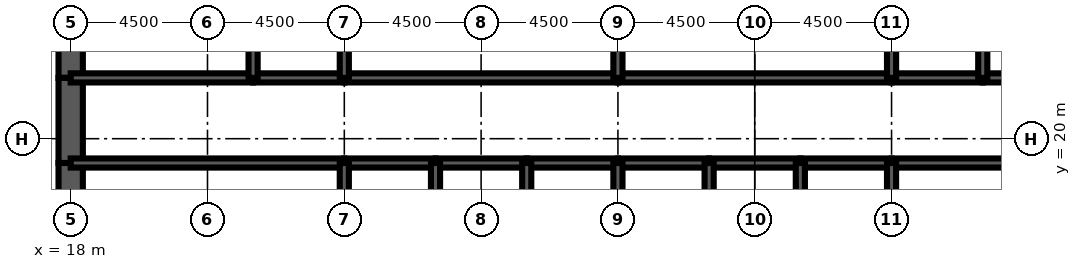
"""IFC4 building model, lengths in metres.
Left out: names, types, materials, properties, quantities, classifications, styles, units other than length and angle.
Written with IfcOpenShell. Run it as: python <this file> out.ifc"""

import sys

from ifc_helpers import new_model, si_unit, direction, frame, frame_2d, origin, place, context, subcontext, project, spatial, rectangle, extrude, element, fill, save


model = new_model("IFC4")
c1 = context("Model", 3, precision=1e-05, world=origin(), true_north=direction((0.0, 1.0)))
c2 = subcontext(c1, "Body", "Model", "MODEL_VIEW")
j1 = project(units=[si_unit("LENGTHUNIT", "METRE"), si_unit("PLANEANGLEUNIT", "RADIAN")], contexts=[c1])
p1 = place(None, origin())
s1 = spatial("IfcSite", under=j1, at=p1, CompositionType="ELEMENT")
p2 = place(p1, origin())
s2 = spatial("IfcBuilding", under=s1, at=p2, CompositionType="ELEMENT")
p3 = place(p2, frame((0.0, 0.0, 215.2)))
s3 = spatial("IfcBuildingStorey", under=s2, at=p3, CompositionType="ELEMENT", Elevation=215.2)
p4 = place(p3, frame((18.0, 26.0, 0.0), z_axis=(0.0, 0.0, 1.0), x_axis=(0.0, -1.0, 0.0)))
e1 = element("IfcWall", 1, at=p4, inside=s3, PredefinedType="SHEAR", context=c2, shape_type="SweptSolid", body=[
    extrude(rectangle(XDim=4.0, YDim=0.8, at=frame_2d((2.0, 0.0))), origin(), (0.0, 0.0, 1.0), 4.2),
])
p5 = place(p3, frame((18.0, 22.0, 0.0), z_axis=(0.0, 0.0, 1.0), x_axis=(0.0, -1.0, 0.0)))
e2 = element("IfcWall", 2, at=p5, inside=s3, PredefinedType="SHEAR", context=c2, shape_type="SweptSolid", body=[
    extrude(rectangle(XDim=2.8, YDim=0.8, at=frame_2d((1.4, 0.0))), origin(), (0.0, 0.0, 1.0), 4.2),
])
p6 = place(p5, frame((0.6, 0.0, 0.0)))
e3 = element("IfcOpeningElement", 3, at=p6, cuts=e2, PredefinedType="OPENING", context=c2, shape_type="SweptSolid", body=[
    extrude(rectangle(XDim=1.8, YDim=2.1, at=frame_2d((0.9, 1.05))), frame((0.0, 0.41, 0.0), z_axis=(0.0, -1.0, 0.0), x_axis=(1.0, 0.0, 0.0)), (0.0, 0.0, 1.0), 0.82),
])
p7 = place(p3, frame((18.0, 19.2, 0.0), z_axis=(0.0, 0.0, 1.0), x_axis=(0.0, -1.0, 0.0)))
e4 = element("IfcWall", 4, at=p7, inside=s3, PredefinedType="SHEAR", context=c2, shape_type="SweptSolid", body=[
    extrude(rectangle(XDim=3.2, YDim=0.8, at=frame_2d((1.6, 0.0))), origin(), (0.0, 0.0, 1.0), 4.2),
])
p8 = place(p3, frame((18.0, 19.2, 0.0), z_axis=(0.0, 0.0, 1.0), x_axis=(1.0, 0.0, 0.0)))
e5 = element("IfcWall", 5, at=p8, inside=s3, PredefinedType="SOLIDWALL", context=c2, shape_type="SweptSolid", body=[
    extrude(rectangle(XDim=9.0, YDim=0.3, at=frame_2d((4.5, 0.0))), origin(), (0.0, 0.0, 1.0), 4.2),
])
p9 = place(p8, frame((0.65, 0.0, 0.0)))
e6 = element("IfcOpeningElement", 6, at=p9, cuts=e5, PredefinedType="OPENING", context=c2, shape_type="SweptSolid", body=[
    extrude(rectangle(XDim=1.0, YDim=2.1, at=frame_2d((0.5, 1.05))), frame((0.0, 0.16, 0.0), z_axis=(0.0, -1.0, 0.0), x_axis=(1.0, 0.0, 0.0)), (0.0, 0.0, 1.0), 0.32),
])
p10 = place(p3, frame((27.0, 19.2, 0.0), z_axis=(0.0, 0.0, 1.0), x_axis=(1.0, 0.0, 0.0)))
e7 = element("IfcWall", 7, at=p10, inside=s3, PredefinedType="SOLIDWALL", context=c2, shape_type="SweptSolid", body=[
    extrude(rectangle(XDim=3.0, YDim=0.3, at=frame_2d((1.5, 0.0))), origin(), (0.0, 0.0, 1.0), 4.2),
])
p11 = place(p10, frame((0.95, 0.0, 0.0)))
e8 = element("IfcOpeningElement", 8, at=p11, cuts=e7, PredefinedType="OPENING", context=c2, shape_type="SweptSolid", body=[
    extrude(rectangle(XDim=1.1, YDim=2.2, at=frame_2d((0.55, 1.1))), frame((0.0, 0.16, 0.0), z_axis=(0.0, -1.0, 0.0), x_axis=(1.0, 0.0, 0.0)), (0.0, 0.0, 1.0), 0.32),
])
p12 = place(p3, frame((30.0, 19.2, 0.0), z_axis=(0.0, 0.0, 1.0), x_axis=(1.0, 0.0, 0.0)))
e9 = element("IfcWall", 9, at=p12, inside=s3, PredefinedType="SOLIDWALL", context=c2, shape_type="SweptSolid", body=[
    extrude(rectangle(XDim=3.0, YDim=0.3, at=frame_2d((1.5, 0.0))), origin(), (0.0, 0.0, 1.0), 4.2),
])
p13 = place(p12, frame((0.95, 0.0, 0.0)))
e10 = element("IfcOpeningElement", 10, at=p13, cuts=e9, PredefinedType="OPENING", context=c2, shape_type="SweptSolid", body=[
    extrude(rectangle(XDim=1.1, YDim=2.2, at=frame_2d((0.55, 1.1))), frame((0.0, 0.16, 0.0), z_axis=(0.0, -1.0, 0.0), x_axis=(1.0, 0.0, 0.0)), (0.0, 0.0, 1.0), 0.32),
])
p14 = place(p3, frame((33.0, 19.2, 0.0), z_axis=(0.0, 0.0, 1.0), x_axis=(1.0, 0.0, 0.0)))
e11 = element("IfcWall", 11, at=p14, inside=s3, PredefinedType="SOLIDWALL", context=c2, shape_type="SweptSolid", body=[
    extrude(rectangle(XDim=3.0, YDim=0.3, at=frame_2d((1.5, 0.0))), origin(), (0.0, 0.0, 1.0), 4.2),
])
p15 = place(p14, frame((0.95, 0.0, 0.0)))
e12 = element("IfcOpeningElement", 12, at=p15, cuts=e11, PredefinedType="OPENING", context=c2, shape_type="SweptSolid", body=[
    extrude(rectangle(XDim=1.1, YDim=2.2, at=frame_2d((0.55, 1.1))), frame((0.0, 0.16, 0.0), z_axis=(0.0, -1.0, 0.0), x_axis=(1.0, 0.0, 0.0)), (0.0, 0.0, 1.0), 0.32),
])
p16 = place(p3, frame((36.0, 19.2, 0.0), z_axis=(0.0, 0.0, 1.0), x_axis=(1.0, 0.0, 0.0)))
e13 = element("IfcWall", 13, at=p16, inside=s3, PredefinedType="SOLIDWALL", context=c2, shape_type="SweptSolid", body=[
    extrude(rectangle(XDim=3.0, YDim=0.3, at=frame_2d((1.5, 0.0))), origin(), (0.0, 0.0, 1.0), 4.2),
])
p17 = place(p16, frame((0.95, 0.0, 0.0)))
e14 = element("IfcOpeningElement", 14, at=p17, cuts=e13, PredefinedType="OPENING", context=c2, shape_type="SweptSolid", body=[
    extrude(rectangle(XDim=1.1, YDim=2.2, at=frame_2d((0.55, 1.1))), frame((0.0, 0.16, 0.0), z_axis=(0.0, -1.0, 0.0), x_axis=(1.0, 0.0, 0.0)), (0.0, 0.0, 1.0), 0.32),
])
p18 = place(p3, frame((39.0, 19.2, 0.0), z_axis=(0.0, 0.0, 1.0), x_axis=(1.0, 0.0, 0.0)))
e15 = element("IfcWall", 15, at=p18, inside=s3, PredefinedType="SOLIDWALL", context=c2, shape_type="SweptSolid", body=[
    extrude(rectangle(XDim=3.0, YDim=0.3, at=frame_2d((1.5, 0.0))), origin(), (0.0, 0.0, 1.0), 4.2),
])
p19 = place(p18, frame((1.0, 0.0, 0.0)))
e16 = element("IfcOpeningElement", 16, at=p19, cuts=e15, PredefinedType="OPENING", context=c2, shape_type="SweptSolid", body=[
    extrude(rectangle(XDim=1.0, YDim=2.1, at=frame_2d((0.5, 1.05))), frame((0.0, 0.16, 0.0), z_axis=(0.0, -1.0, 0.0), x_axis=(1.0, 0.0, 0.0)), (0.0, 0.0, 1.0), 0.32),
])
p20 = place(p3, frame((42.0, 19.2, 0.0), z_axis=(0.0, 0.0, 1.0), x_axis=(1.0, 0.0, 0.0)))
e17 = element("IfcWall", 17, at=p20, inside=s3, PredefinedType="SOLIDWALL", context=c2, shape_type="SweptSolid", body=[
    extrude(rectangle(XDim=3.0, YDim=0.3, at=frame_2d((1.5, 0.0))), origin(), (0.0, 0.0, 1.0), 4.2),
])
p21 = place(p20, frame((1.0, 0.0, 0.0)))
e18 = element("IfcOpeningElement", 18, at=p21, cuts=e17, PredefinedType="OPENING", context=c2, shape_type="SweptSolid", body=[
    extrude(rectangle(XDim=1.0, YDim=2.1, at=frame_2d((0.5, 1.05))), frame((0.0, 0.16, 0.0), z_axis=(0.0, -1.0, 0.0), x_axis=(1.0, 0.0, 0.0)), (0.0, 0.0, 1.0), 0.32),
])
p22 = place(p3, frame((45.0, 19.2, 0.0), z_axis=(0.0, 0.0, 1.0), x_axis=(1.0, 0.0, 0.0)))
e19 = element("IfcWall", 19, at=p22, inside=s3, PredefinedType="SOLIDWALL", context=c2, shape_type="SweptSolid", body=[
    extrude(rectangle(XDim=9.0, YDim=0.3, at=frame_2d((4.5, 0.0))), origin(), (0.0, 0.0, 1.0), 4.2),
])
p23 = place(p22, frame((7.35, 0.0, 0.0)))
e20 = element("IfcOpeningElement", 20, at=p23, cuts=e19, PredefinedType="OPENING", context=c2, shape_type="SweptSolid", body=[
    extrude(rectangle(XDim=1.0, YDim=2.1, at=frame_2d((0.5, 1.05))), frame((0.0, 0.16, 0.0), z_axis=(0.0, -1.0, 0.0), x_axis=(1.0, 0.0, 0.0)), (0.0, 0.0, 1.0), 0.32),
])
p24 = place(p3, frame((18.0, 22.0, 0.0), z_axis=(0.0, 0.0, 1.0), x_axis=(1.0, 0.0, 0.0)))
e21 = element("IfcWall", 21, at=p24, inside=s3, PredefinedType="SOLIDWALL", context=c2, shape_type="SweptSolid", body=[
    extrude(rectangle(XDim=6.0, YDim=0.3, at=frame_2d((3.0, 0.0))), origin(), (0.0, 0.0, 1.0), 4.2),
])
p25 = place(p24, frame((4.4, 0.0, 0.0)))
e22 = element("IfcOpeningElement", 22, at=p25, cuts=e21, PredefinedType="OPENING", context=c2, shape_type="SweptSolid", body=[
    extrude(rectangle(XDim=1.0, YDim=2.1, at=frame_2d((0.5, 1.05))), frame((0.0, 0.16, 0.0), z_axis=(0.0, -1.0, 0.0), x_axis=(1.0, 0.0, 0.0)), (0.0, 0.0, 1.0), 0.32),
])
p26 = place(p24, frame((0.65, 0.0, 0.0)))
e23 = element("IfcOpeningElement", 23, at=p26, cuts=e21, PredefinedType="OPENING", context=c2, shape_type="SweptSolid", body=[
    extrude(rectangle(XDim=1.0, YDim=2.1, at=frame_2d((0.5, 1.05))), frame((0.0, 0.16, 0.0), z_axis=(0.0, -1.0, 0.0), x_axis=(1.0, 0.0, 0.0)), (0.0, 0.0, 1.0), 0.32),
])
p27 = place(p3, frame((24.0, 22.0, 0.0), z_axis=(0.0, 0.0, 1.0), x_axis=(1.0, 0.0, 0.0)))
e24 = element("IfcWall", 24, at=p27, inside=s3, PredefinedType="SOLIDWALL", context=c2, shape_type="SweptSolid", body=[
    extrude(rectangle(XDim=3.0, YDim=0.3, at=frame_2d((1.5, 0.0))), origin(), (0.0, 0.0, 1.0), 4.2),
])
p28 = place(p27, frame((1.0, 0.0, 0.0)))
e25 = element("IfcOpeningElement", 25, at=p28, cuts=e24, PredefinedType="OPENING", context=c2, shape_type="SweptSolid", body=[
    extrude(rectangle(XDim=1.0, YDim=2.1, at=frame_2d((0.5, 1.05))), frame((0.0, 0.16, 0.0), z_axis=(0.0, -1.0, 0.0), x_axis=(1.0, 0.0, 0.0)), (0.0, 0.0, 1.0), 0.32),
])
p29 = place(p3, frame((27.0, 22.0, 0.0), z_axis=(0.0, 0.0, 1.0), x_axis=(1.0, 0.0, 0.0)))
e26 = element("IfcWall", 26, at=p29, inside=s3, PredefinedType="SOLIDWALL", context=c2, shape_type="SweptSolid", body=[
    extrude(rectangle(XDim=9.0, YDim=0.3, at=frame_2d((4.5, 0.0))), origin(), (0.0, 0.0, 1.0), 4.2),
])
p30 = place(p29, frame((4.0, 0.0, 0.0)))
e27 = element("IfcOpeningElement", 27, at=p30, cuts=e26, PredefinedType="OPENING", context=c2, shape_type="SweptSolid", body=[
    extrude(rectangle(XDim=1.0, YDim=2.1, at=frame_2d((0.5, 1.05))), frame((0.0, 0.16, 0.0), z_axis=(0.0, -1.0, 0.0), x_axis=(1.0, 0.0, 0.0)), (0.0, 0.0, 1.0), 0.32),
])
p31 = place(p3, frame((36.0, 22.0, 0.0), z_axis=(0.0, 0.0, 1.0), x_axis=(1.0, 0.0, 0.0)))
e28 = element("IfcWall", 28, at=p31, inside=s3, PredefinedType="SOLIDWALL", context=c2, shape_type="SweptSolid", body=[
    extrude(rectangle(XDim=9.0, YDim=0.3, at=frame_2d((4.5, 0.0))), origin(), (0.0, 0.0, 1.0), 4.2),
])
p32 = place(p31, frame((4.0, 0.0, 0.0)))
e29 = element("IfcOpeningElement", 29, at=p32, cuts=e28, PredefinedType="OPENING", context=c2, shape_type="SweptSolid", body=[
    extrude(rectangle(XDim=1.0, YDim=2.1, at=frame_2d((0.5, 1.05))), frame((0.0, 0.16, 0.0), z_axis=(0.0, -1.0, 0.0), x_axis=(1.0, 0.0, 0.0)), (0.0, 0.0, 1.0), 0.32),
])
p33 = place(p3, frame((45.0, 22.0, 0.0), z_axis=(0.0, 0.0, 1.0), x_axis=(1.0, 0.0, 0.0)))
e30 = element("IfcWall", 30, at=p33, inside=s3, PredefinedType="SOLIDWALL", context=c2, shape_type="SweptSolid", body=[
    extrude(rectangle(XDim=3.0, YDim=0.3, at=frame_2d((1.5, 0.0))), origin(), (0.0, 0.0, 1.0), 4.2),
])
p34 = place(p33, frame((1.0, 0.0, 0.0)))
e31 = element("IfcOpeningElement", 31, at=p34, cuts=e30, PredefinedType="OPENING", context=c2, shape_type="SweptSolid", body=[
    extrude(rectangle(XDim=1.0, YDim=2.1, at=frame_2d((0.5, 1.05))), frame((0.0, 0.16, 0.0), z_axis=(0.0, -1.0, 0.0), x_axis=(1.0, 0.0, 0.0)), (0.0, 0.0, 1.0), 0.32),
])
p35 = place(p3, frame((48.0, 22.0, 0.0), z_axis=(0.0, 0.0, 1.0), x_axis=(1.0, 0.0, 0.0)))
e32 = element("IfcWall", 32, at=p35, inside=s3, PredefinedType="SOLIDWALL", context=c2, shape_type="SweptSolid", body=[
    extrude(rectangle(XDim=6.0, YDim=0.3, at=frame_2d((3.0, 0.0))), origin(), (0.0, 0.0, 1.0), 4.2),
])
p36 = place(p35, frame((2.0, 0.0, 0.0)))
e33 = element("IfcOpeningElement", 33, at=p36, cuts=e32, PredefinedType="OPENING", context=c2, shape_type="SweptSolid", body=[
    extrude(rectangle(XDim=1.0, YDim=2.1, at=frame_2d((0.5, 1.05))), frame((0.0, 0.16, 0.0), z_axis=(0.0, -1.0, 0.0), x_axis=(1.0, 0.0, 0.0)), (0.0, 0.0, 1.0), 0.32),
])
p37 = place(p35, frame((4.05, 0.0, 0.0)))
e34 = element("IfcOpeningElement", 34, at=p37, cuts=e32, PredefinedType="OPENING", context=c2, shape_type="SweptSolid", body=[
    extrude(rectangle(XDim=1.0, YDim=2.1, at=frame_2d((0.5, 1.05))), frame((0.0, 0.16, 0.0), z_axis=(0.0, -1.0, 0.0), x_axis=(1.0, 0.0, 0.0)), (0.0, 0.0, 1.0), 0.32),
])
for number, where, z_axis, x_axis in (
    (35, (27.0, 16.0, 0.0), (0.0, 0.0, 1.0), (0.0, 1.0, 0.0)),
    (36, (30.0, 16.0, 0.0), (0.0, 0.0, 1.0), (0.0, 1.0, 0.0)),
    (37, (33.0, 16.0, 0.0), (0.0, 0.0, 1.0), (0.0, 1.0, 0.0)),
    (38, (36.0, 16.0, 0.0), (0.0, 0.0, 1.0), (0.0, 1.0, 0.0)),
    (39, (39.0, 16.0, 0.0), (0.0, 0.0, 1.0), (0.0, 1.0, 0.0)),
    (40, (42.0, 16.0, 0.0), (0.0, 0.0, 1.0), (0.0, 1.0, 0.0)),
    (41, (45.0, 16.0, 0.0), (0.0, 0.0, 1.0), (0.0, 1.0, 0.0)),
):
    element("IfcWall", number, at=place(p3, frame(where, z_axis=z_axis, x_axis=x_axis)), inside=s3, PredefinedType="SOLIDWALL", context=c2, shape_type="SweptSolid", body=[
        extrude(rectangle(XDim=3.2, YDim=0.3, at=frame_2d((1.6, 0.0))), origin(), (0.0, 0.0, 1.0), 4.2),
    ])
for number, where, z_axis, x_axis in (
    (42, (24.0, 22.0, 0.0), (0.0, 0.0, 1.0), (0.0, 1.0, 0.0)),
    (43, (27.0, 22.0, 0.0), (0.0, 0.0, 1.0), (0.0, 1.0, 0.0)),
    (44, (36.0, 22.0, 0.0), (0.0, 0.0, 1.0), (0.0, 1.0, 0.0)),
    (45, (45.0, 22.0, 0.0), (0.0, 0.0, 1.0), (0.0, 1.0, 0.0)),
    (46, (48.0, 22.0, 0.0), (0.0, 0.0, 1.0), (0.0, 1.0, 0.0)),
):
    element("IfcWall", number, at=place(p3, frame(where, z_axis=z_axis, x_axis=x_axis)), inside=s3, PredefinedType="SOLIDWALL", context=c2, shape_type="SweptSolid", body=[
        extrude(rectangle(XDim=4.0, YDim=0.3, at=frame_2d((2.0, 0.0))), origin(), (0.0, 0.0, 1.0), 4.2),
    ])
p38 = place(p3, frame((39.0, 22.15, 0.0), z_axis=(0.0, 0.0, 1.0), x_axis=(0.0, 1.0, 0.0)))
e47 = element("IfcWall", 47, at=p38, inside=s3, PredefinedType="PARTITIONING", context=c2, shape_type="SweptSolid", body=[
    extrude(rectangle(XDim=3.7, YDim=0.15, at=frame_2d((1.85, 0.0))), origin(), (0.0, 0.0, 1.0), 3.0),
])
p39 = place(p38, frame((2.2, 0.0, 0.0)))
e48 = element("IfcOpeningElement", 48, at=p39, cuts=e47, PredefinedType="OPENING", context=c2, shape_type="SweptSolid", body=[
    extrude(rectangle(XDim=1.0, YDim=2.1, at=frame_2d((0.5, 1.05))), frame((0.0, 0.085, 0.0), z_axis=(0.0, -1.0, 0.0), x_axis=(1.0, 0.0, 0.0)), (0.0, 0.0, 1.0), 0.17),
])
p40 = place(p3, frame((19.975, 22.15, 0.0), z_axis=(0.0, 0.0, 1.0), x_axis=(0.0, 1.0, 0.0)))
e49 = element("IfcWall", 49, at=p40, inside=s3, PredefinedType="PARTITIONING", context=c2, shape_type="SweptSolid", body=[
    extrude(rectangle(XDim=3.7, YDim=0.15, at=frame_2d((1.85, 0.0))), origin(), (0.0, 0.0, 1.0), 3.0),
])
p41 = place(p3, frame((47.7, 19.35, 0.0), z_axis=(0.0, 0.0, 1.0), x_axis=(0.0, 1.0, 0.0)))
e50 = element("IfcWall", 50, at=p41, inside=s3, PredefinedType="PARTITIONING", context=c2, shape_type="SweptSolid", body=[
    extrude(rectangle(XDim=2.5, YDim=0.15, at=frame_2d((1.25, 0.0))), origin(), (0.0, 0.0, 1.0), 3.0),
])
p42 = place(p41, frame((1.15, 0.0, 0.0)))
e51 = element("IfcOpeningElement", 51, at=p42, cuts=e50, PredefinedType="OPENING", context=c2, shape_type="SweptSolid", body=[
    extrude(rectangle(XDim=1.0, YDim=2.1, at=frame_2d((0.5, 1.05))), frame((0.0, 0.085, 0.0), z_axis=(0.0, -1.0, 0.0), x_axis=(1.0, 0.0, 0.0)), (0.0, 0.0, 1.0), 0.17),
])
p43 = place(p42, origin())
e52 = element("IfcDoor", 52, at=p43, inside=s3, OperationType="SINGLE_SWING_RIGHT", PredefinedType="DOOR", context=c2, shape_type="SweptSolid", body=[
    extrude(rectangle(XDim=1.0, YDim=2.1, at=frame_2d((0.5, 1.05))), frame((0.0, 0.025, 0.0), z_axis=(0.0, -1.0, 0.0), x_axis=(1.0, 0.0, 0.0)), (0.0, 0.0, 1.0), 0.05),
])
fill(e51, e52)
p44 = place(p11, origin())
e53 = element("IfcDoor", 53, at=p44, inside=s3, OperationType="DOUBLE_DOOR_SLIDING", PredefinedType="USERDEFINED", context=c2, shape_type="SweptSolid", body=[
    extrude(rectangle(XDim=1.1, YDim=2.2, at=frame_2d((0.55, 1.1))), frame((0.0, 0.025, 0.0), z_axis=(0.0, -1.0, 0.0), x_axis=(1.0, 0.0, 0.0)), (0.0, 0.0, 1.0), 0.05),
])
fill(e8, e53)
p45 = place(p13, origin())
e54 = element("IfcDoor", 54, at=p45, inside=s3, OperationType="DOUBLE_DOOR_SLIDING", PredefinedType="USERDEFINED", context=c2, shape_type="SweptSolid", body=[
    extrude(rectangle(XDim=1.1, YDim=2.2, at=frame_2d((0.55, 1.1))), frame((0.0, 0.025, 0.0), z_axis=(0.0, -1.0, 0.0), x_axis=(1.0, 0.0, 0.0)), (0.0, 0.0, 1.0), 0.05),
])
fill(e10, e54)
p46 = place(p15, origin())
e55 = element("IfcDoor", 55, at=p46, inside=s3, OperationType="DOUBLE_DOOR_SLIDING", PredefinedType="USERDEFINED", context=c2, shape_type="SweptSolid", body=[
    extrude(rectangle(XDim=1.1, YDim=2.2, at=frame_2d((0.55, 1.1))), frame((0.0, 0.025, 0.0), z_axis=(0.0, -1.0, 0.0), x_axis=(1.0, 0.0, 0.0)), (0.0, 0.0, 1.0), 0.05),
])
fill(e12, e55)
p47 = place(p17, origin())
e56 = element("IfcDoor", 56, at=p47, inside=s3, OperationType="DOUBLE_DOOR_SLIDING", PredefinedType="USERDEFINED", context=c2, shape_type="SweptSolid", body=[
    extrude(rectangle(XDim=1.1, YDim=2.2, at=frame_2d((0.55, 1.1))), frame((0.0, 0.025, 0.0), z_axis=(0.0, -1.0, 0.0), x_axis=(1.0, 0.0, 0.0)), (0.0, 0.0, 1.0), 0.05),
])
fill(e14, e56)
p48 = place(p9, origin())
e57 = element("IfcDoor", 57, at=p48, inside=s3, OperationType="SINGLE_SWING_LEFT", PredefinedType="DOOR", context=c2, shape_type="SweptSolid", body=[
    extrude(rectangle(XDim=1.0, YDim=2.1, at=frame_2d((0.5, 1.05))), frame((0.0, 0.025, 0.0), z_axis=(0.0, -1.0, 0.0), x_axis=(1.0, 0.0, 0.0)), (0.0, 0.0, 1.0), 0.05),
])
fill(e6, e57)
p49 = place(p6, origin())
e58 = element("IfcDoor", 58, at=p49, inside=s3, OperationType="SINGLE_SWING_LEFT", PredefinedType="DOOR", context=c2, shape_type="SweptSolid", body=[
    extrude(rectangle(XDim=1.8, YDim=2.1, at=frame_2d((0.9, 1.05))), frame((0.0, 0.4, 0.0), z_axis=(0.0, -1.0, 0.0), x_axis=(1.0, 0.0, 0.0)), (0.0, 0.0, 1.0), 0.8),
])
fill(e3, e58)
p50 = place(p25, origin())
e59 = element("IfcDoor", 59, at=p50, inside=s3, OperationType="SINGLE_SWING_RIGHT", PredefinedType="DOOR", context=c2, shape_type="SweptSolid", body=[
    extrude(rectangle(XDim=1.0, YDim=2.1, at=frame_2d((0.5, 1.05))), frame((0.0, 0.025, 0.0), z_axis=(0.0, -1.0, 0.0), x_axis=(1.0, 0.0, 0.0)), (0.0, 0.0, 1.0), 0.05),
])
fill(e22, e59)
p51 = place(p28, origin())
e60 = element("IfcDoor", 60, at=p51, inside=s3, OperationType="SINGLE_SWING_LEFT", PredefinedType="DOOR", context=c2, shape_type="SweptSolid", body=[
    extrude(rectangle(XDim=1.0, YDim=2.1, at=frame_2d((0.5, 1.05))), frame((0.0, 0.025, 0.0), z_axis=(0.0, -1.0, 0.0), x_axis=(1.0, 0.0, 0.0)), (0.0, 0.0, 1.0), 0.05),
])
fill(e25, e60)
p52 = place(p30, origin())
e61 = element("IfcDoor", 61, at=p52, inside=s3, OperationType="SINGLE_SWING_LEFT", PredefinedType="DOOR", context=c2, shape_type="SweptSolid", body=[
    extrude(rectangle(XDim=1.0, YDim=2.1, at=frame_2d((0.5, 1.05))), frame((0.0, 0.025, 0.0), z_axis=(0.0, -1.0, 0.0), x_axis=(1.0, 0.0, 0.0)), (0.0, 0.0, 1.0), 0.05),
])
fill(e27, e61)
p53 = place(p32, origin())
e62 = element("IfcDoor", 62, at=p53, inside=s3, OperationType="SINGLE_SWING_LEFT", PredefinedType="DOOR", context=c2, shape_type="SweptSolid", body=[
    extrude(rectangle(XDim=1.0, YDim=2.1, at=frame_2d((0.5, 1.05))), frame((0.0, 0.025, 0.0), z_axis=(0.0, -1.0, 0.0), x_axis=(1.0, 0.0, 0.0)), (0.0, 0.0, 1.0), 0.05),
])
fill(e29, e62)
p54 = place(p34, origin())
e63 = element("IfcDoor", 63, at=p54, inside=s3, OperationType="SINGLE_SWING_LEFT", PredefinedType="DOOR", context=c2, shape_type="SweptSolid", body=[
    extrude(rectangle(XDim=1.0, YDim=2.1, at=frame_2d((0.5, 1.05))), frame((0.0, 0.025, 0.0), z_axis=(0.0, -1.0, 0.0), x_axis=(1.0, 0.0, 0.0)), (0.0, 0.0, 1.0), 0.05),
])
fill(e31, e63)
p55 = place(p26, origin())
e64 = element("IfcDoor", 64, at=p55, inside=s3, OperationType="SINGLE_SWING_LEFT", PredefinedType="DOOR", context=c2, shape_type="SweptSolid", body=[
    extrude(rectangle(XDim=1.0, YDim=2.1, at=frame_2d((0.5, 1.05))), frame((0.0, 0.025, 0.0), z_axis=(0.0, -1.0, 0.0), x_axis=(1.0, 0.0, 0.0)), (0.0, 0.0, 1.0), 0.05),
])
fill(e23, e64)
p56 = place(p19, origin())
e65 = element("IfcDoor", 65, at=p56, inside=s3, OperationType="SINGLE_SWING_LEFT", PredefinedType="DOOR", context=c2, shape_type="SweptSolid", body=[
    extrude(rectangle(XDim=1.0, YDim=2.1, at=frame_2d((0.5, 1.05))), frame((0.0, 0.025, 0.0), z_axis=(0.0, -1.0, 0.0), x_axis=(1.0, 0.0, 0.0)), (0.0, 0.0, 1.0), 0.05),
])
fill(e16, e65)
p57 = place(p21, origin())
e66 = element("IfcDoor", 66, at=p57, inside=s3, OperationType="SINGLE_SWING_LEFT", PredefinedType="DOOR", context=c2, shape_type="SweptSolid", body=[
    extrude(rectangle(XDim=1.0, YDim=2.1, at=frame_2d((0.5, 1.05))), frame((0.0, 0.025, 0.0), z_axis=(0.0, -1.0, 0.0), x_axis=(1.0, 0.0, 0.0)), (0.0, 0.0, 1.0), 0.05),
])
fill(e18, e66)
save(model, sys.argv[1])
